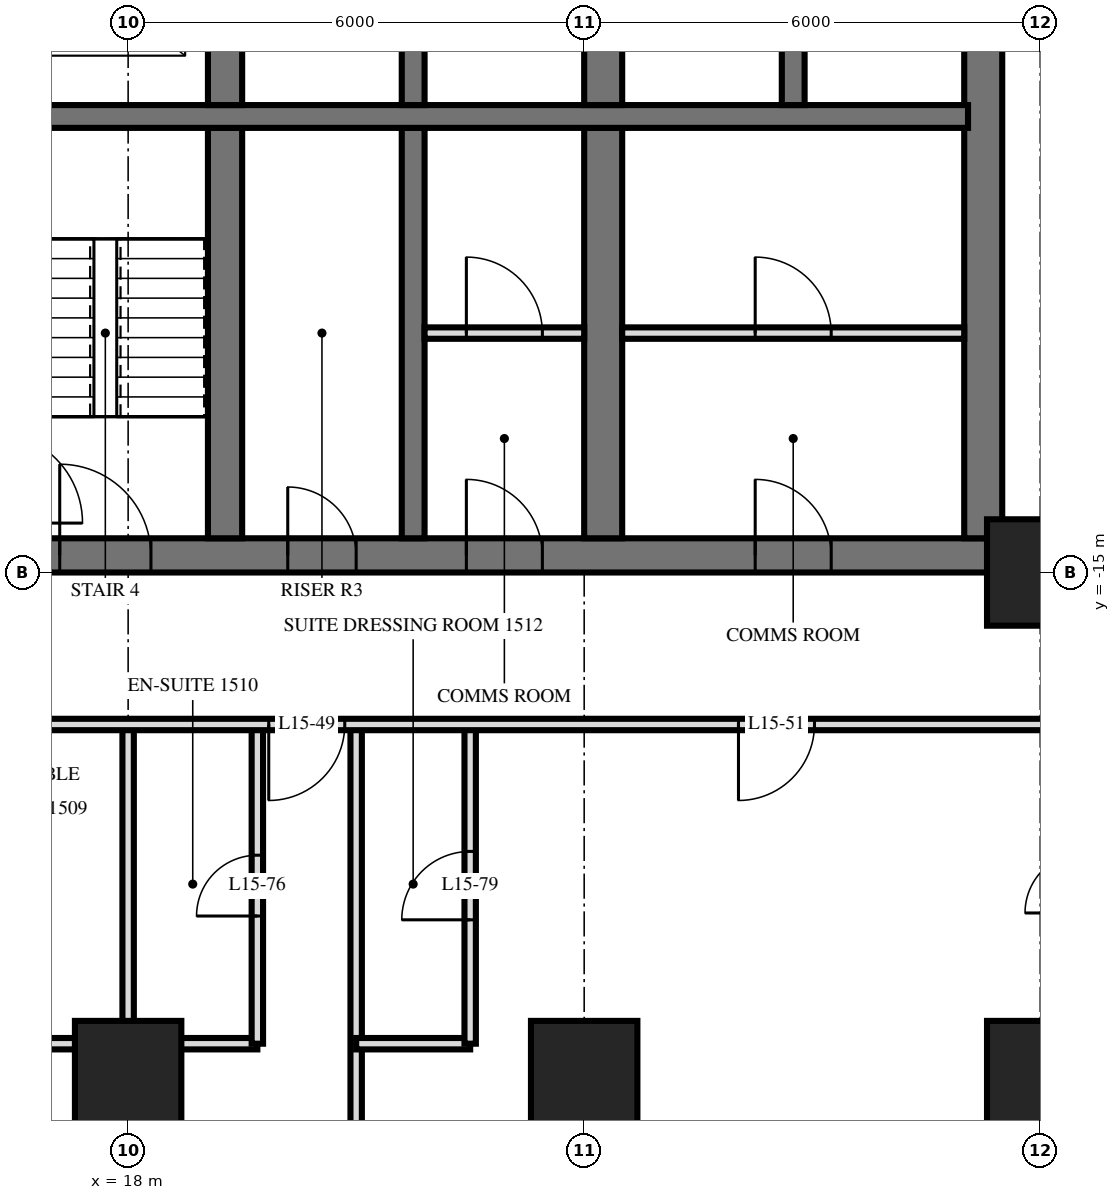
"""IFC4 building model, lengths in metres.
Left out: names, types, materials, properties, quantities, classifications, styles, units other than length and angle.
Written with IfcOpenShell. Run it as: python <this file> out.ifc"""

import sys

from ifc_helpers import new_model, si_unit, direction, frame, frame_2d, origin, origin_2d, place, context, subcontext, project, spatial, rectangle, extrude, element, fill, save


model = new_model("IFC4")
c1 = context("Model", 3, precision=1e-05, world=origin(), true_north=direction((0.0, 1.0)))
c2 = subcontext(c1, "Body", "Model", "MODEL_VIEW")
j1 = project(units=[si_unit("LENGTHUNIT", "METRE"), si_unit("PLANEANGLEUNIT", "RADIAN")], contexts=[c1])
p1 = place(None, origin())
s1 = spatial("IfcSite", under=j1, at=p1, CompositionType="ELEMENT")
p2 = place(p1, origin())
s2 = spatial("IfcBuilding", under=s1, at=p2, CompositionType="ELEMENT")
p3 = place(p2, frame((0.0, 0.0, 63.6)))
s3 = spatial("IfcBuildingStorey", under=s2, at=p3, CompositionType="ELEMENT", Elevation=63.6)
for number, where, z_axis, x_axis in (
    (1, (18.0, -21.6, 0.0), (0.0, 0.0, 1.0), (1.0, 0.0, 0.0)),
    (2, (24.0, -21.6, 0.0), (0.0, 0.0, 1.0), (1.0, 0.0, 0.0)),
    (3, (30.0, -21.6, 0.0), (0.0, 0.0, 1.0), (1.0, 0.0, 0.0)),
    (4, (30.0, -15.0, 0.0), (0.0, 0.0, 1.0), (1.0, 0.0, 0.0)),
):
    element("IfcColumn", number, at=place(p3, frame(where, z_axis=z_axis, x_axis=x_axis)), inside=s3, PredefinedType="COLUMN", context=c2, shape_type="SweptSolid", body=[
        extrude(rectangle(XDim=1.4, YDim=1.4, at=origin_2d()), origin(), (0.0, 0.0, 1.0), 3.6),
    ])
p4 = place(p3, frame((10.0, -14.775, 0.0), z_axis=(0.0, 0.0, 1.0), x_axis=(1.0, 0.0, 0.0)))
e5 = element("IfcWall", 5, at=p4, inside=s3, PredefinedType="SHEAR", context=c2, shape_type="SweptSolid", body=[
    extrude(rectangle(XDim=19.5, YDim=0.45, at=frame_2d((9.75, 0.0))), origin(), (0.0, 0.0, 1.0), 3.6),
])
p5 = place(p4, frame((7.1, 0.0, 0.0)))
e6 = element("IfcOpeningElement", 6, at=p5, cuts=e5, PredefinedType="OPENING", context=c2, shape_type="SweptSolid", body=[
    extrude(rectangle(XDim=1.2, YDim=2.1, at=frame_2d((0.6, 1.05))), frame((0.0, 0.235, 0.0), z_axis=(0.0, -1.0, 0.0), x_axis=(1.0, 0.0, 0.0)), (0.0, 0.0, 1.0), 0.47),
])
p6 = place(p4, frame((4.15, 0.0, 0.0)))
e7 = element("IfcOpeningElement", 7, at=p6, cuts=e5, PredefinedType="OPENING", context=c2, shape_type="SweptSolid", body=[
    extrude(rectangle(XDim=1.1, YDim=2.1, at=frame_2d((0.55, 1.05))), frame((0.0, 0.235, 0.0), z_axis=(0.0, -1.0, 0.0), x_axis=(1.0, 0.0, 0.0)), (0.0, 0.0, 1.0), 0.47),
])
p7 = place(p4, frame((10.1, 0.0, 0.0)))
e8 = element("IfcOpeningElement", 8, at=p7, cuts=e5, PredefinedType="OPENING", context=c2, shape_type="SweptSolid", body=[
    extrude(rectangle(XDim=0.9, YDim=2.1, at=frame_2d((0.45, 1.05))), frame((0.0, 0.235, 0.0), z_axis=(0.0, -1.0, 0.0), x_axis=(1.0, 0.0, 0.0)), (0.0, 0.0, 1.0), 0.47),
])
p8 = place(p4, frame((12.45, 0.0, 0.0)))
e9 = element("IfcOpeningElement", 9, at=p8, cuts=e5, PredefinedType="OPENING", context=c2, shape_type="SweptSolid", body=[
    extrude(rectangle(XDim=1.0, YDim=2.1, at=frame_2d((0.5, 1.05))), frame((0.0, 0.235, 0.0), z_axis=(0.0, -1.0, 0.0), x_axis=(1.0, 0.0, 0.0)), (0.0, 0.0, 1.0), 0.47),
])
p9 = place(p4, frame((16.25, 0.0, 0.0)))
e10 = element("IfcOpeningElement", 10, at=p9, cuts=e5, PredefinedType="OPENING", context=c2, shape_type="SweptSolid", body=[
    extrude(rectangle(XDim=1.0, YDim=2.1, at=frame_2d((0.5, 1.05))), frame((0.0, 0.235, 0.0), z_axis=(0.0, -1.0, 0.0), x_axis=(1.0, 0.0, 0.0)), (0.0, 0.0, 1.0), 0.47),
])
p10 = place(p3, frame((29.25, -14.55, 0.0), z_axis=(0.0, 0.0, 1.0), x_axis=(0.0, 1.0, 0.0)))
e11 = element("IfcWall", 11, at=p10, inside=s3, PredefinedType="SHEAR", context=c2, shape_type="SweptSolid", body=[
    extrude(rectangle(XDim=14.1, YDim=0.5, at=frame_2d((7.05, 0.0))), origin(), (0.0, 0.0, 1.0), 3.6),
])
p11 = place(p3, frame((10.35, -9.0, 0.0), z_axis=(0.0, 0.0, 1.0), x_axis=(1.0, 0.0, 0.0)))
e12 = element("IfcWall", 12, at=p11, inside=s3, PredefinedType="SHEAR", context=c2, shape_type="SweptSolid", body=[
    extrude(rectangle(XDim=18.7, YDim=0.3, at=frame_2d((9.35, 0.0))), origin(), (0.0, 0.0, 1.0), 3.6),
])
p12 = place(p11, frame((3.8, 0.0, 0.0)))
e13 = element("IfcOpeningElement", 13, at=p12, cuts=e12, PredefinedType="OPENING", context=c2, shape_type="SweptSolid", body=[
    extrude(rectangle(XDim=1.1, YDim=2.1, at=frame_2d((0.55, 1.05))), frame((0.0, 0.16, 0.0), z_axis=(0.0, -1.0, 0.0), x_axis=(1.0, 0.0, 0.0)), (0.0, 0.0, 1.0), 0.32),
])
p13 = place(p3, frame((19.275, -8.85, 0.0), z_axis=(0.0, 0.0, 1.0), x_axis=(0.0, 1.0, 0.0)))
e14 = element("IfcWall", 14, at=p13, inside=s3, PredefinedType="SHEAR", context=c2, shape_type="SweptSolid", body=[
    extrude(rectangle(XDim=2.3, YDim=0.45, at=frame_2d((1.15, 0.0))), origin(), (0.0, 0.0, 1.0), 3.6),
])
p14 = place(p3, frame((19.275, -14.55, 0.0), z_axis=(0.0, 0.0, 1.0), x_axis=(0.0, 1.0, 0.0)))
e15 = element("IfcWall", 15, at=p14, inside=s3, PredefinedType="SHEAR", context=c2, shape_type="SweptSolid", body=[
    extrude(rectangle(XDim=5.4, YDim=0.45, at=frame_2d((2.7, 0.0))), origin(), (0.0, 0.0, 1.0), 3.6),
])
p15 = place(p3, frame((21.75, -8.85, 0.0), z_axis=(0.0, 0.0, 1.0), x_axis=(0.0, 1.0, 0.0)))
e16 = element("IfcWall", 16, at=p15, inside=s3, PredefinedType="SHEAR", context=c2, shape_type="SweptSolid", body=[
    extrude(rectangle(XDim=2.3, YDim=0.3, at=frame_2d((1.15, 0.0))), origin(), (0.0, 0.0, 1.0), 3.6),
])
p16 = place(p3, frame((21.75, -14.55, 0.0), z_axis=(0.0, 0.0, 1.0), x_axis=(0.0, 1.0, 0.0)))
e17 = element("IfcWall", 17, at=p16, inside=s3, PredefinedType="SHEAR", context=c2, shape_type="SweptSolid", body=[
    extrude(rectangle(XDim=5.4, YDim=0.3, at=frame_2d((2.7, 0.0))), origin(), (0.0, 0.0, 1.0), 3.6),
])
p17 = place(p3, frame((24.25, -8.85, 0.0), z_axis=(0.0, 0.0, 1.0), x_axis=(0.0, 1.0, 0.0)))
e18 = element("IfcWall", 18, at=p17, inside=s3, PredefinedType="SHEAR", context=c2, shape_type="SweptSolid", body=[
    extrude(rectangle(XDim=2.3, YDim=0.5, at=frame_2d((1.15, 0.0))), origin(), (0.0, 0.0, 1.0), 3.6),
])
p18 = place(p3, frame((24.25, -14.55, 0.0), z_axis=(0.0, 0.0, 1.0), x_axis=(0.0, 1.0, 0.0)))
e19 = element("IfcWall", 19, at=p18, inside=s3, PredefinedType="SHEAR", context=c2, shape_type="SweptSolid", body=[
    extrude(rectangle(XDim=5.4, YDim=0.5, at=frame_2d((2.7, 0.0))), origin(), (0.0, 0.0, 1.0), 3.6),
])
p19 = place(p3, frame((26.75, -8.85, 0.0), z_axis=(0.0, 0.0, 1.0), x_axis=(0.0, 1.0, 0.0)))
e20 = element("IfcWall", 20, at=p19, inside=s3, PredefinedType="SHEAR", context=c2, shape_type="SweptSolid", body=[
    extrude(rectangle(XDim=2.3, YDim=0.3, at=frame_2d((1.15, 0.0))), origin(), (0.0, 0.0, 1.0), 3.6),
])
p20 = place(p3, frame((21.9, -11.85, 0.0), z_axis=(0.0, 0.0, 1.0), x_axis=(1.0, 0.0, 0.0)))
e21 = element("IfcWall", 21, at=p20, inside=s3, PredefinedType="PARTITIONING", context=c2, shape_type="SweptSolid", body=[
    extrude(rectangle(XDim=2.1, YDim=0.15, at=frame_2d((1.05, 0.0))), origin(), (0.0, 0.0, 1.0), 3.3),
])
p21 = place(p20, frame((0.55, 0.0, 0.0)))
e22 = element("IfcOpeningElement", 22, at=p21, cuts=e21, PredefinedType="OPENING", context=c2, shape_type="SweptSolid", body=[
    extrude(rectangle(XDim=1.0, YDim=2.1, at=frame_2d((0.5, 1.05))), frame((0.0, 0.085, 0.0), z_axis=(0.0, -1.0, 0.0), x_axis=(1.0, 0.0, 0.0)), (0.0, 0.0, 1.0), 0.17),
])
p22 = place(p3, frame((24.5, -11.85, 0.0), z_axis=(0.0, 0.0, 1.0), x_axis=(1.0, 0.0, 0.0)))
e23 = element("IfcWall", 23, at=p22, inside=s3, PredefinedType="PARTITIONING", context=c2, shape_type="SweptSolid", body=[
    extrude(rectangle(XDim=4.5, YDim=0.15, at=frame_2d((2.25, 0.0))), origin(), (0.0, 0.0, 1.0), 3.3),
])
p23 = place(p22, frame((1.75, 0.0, 0.0)))
e24 = element("IfcOpeningElement", 24, at=p23, cuts=e23, PredefinedType="OPENING", context=c2, shape_type="SweptSolid", body=[
    extrude(rectangle(XDim=1.0, YDim=2.1, at=frame_2d((0.5, 1.05))), frame((0.0, 0.085, 0.0), z_axis=(0.0, -1.0, 0.0), x_axis=(1.0, 0.0, 0.0)), (0.0, 0.0, 1.0), 0.17),
])
p24 = place(p3, frame((22.5, -21.2, 0.0), z_axis=(0.0, 0.0, 1.0), x_axis=(0.0, 1.0, 0.0)))
e25 = element("IfcWall", 25, at=p24, inside=s3, PredefinedType="PARTITIONING", context=c2, shape_type="SweptSolid", body=[
    extrude(rectangle(XDim=4.2, YDim=0.15, at=frame_2d((2.1, 0.0))), origin(), (0.0, 0.0, 1.0), 3.32),
])
p25 = place(p24, frame((1.63, 0.0, 0.0)))
e26 = element("IfcOpeningElement", 26, at=p25, cuts=e25, PredefinedType="OPENING", context=c2, shape_type="SweptSolid", body=[
    extrude(rectangle(XDim=0.9, YDim=2.1, at=frame_2d((0.45, 1.05))), frame((0.0, 0.085, 0.0), z_axis=(0.0, -1.0, 0.0), x_axis=(1.0, 0.0, 0.0)), (0.0, 0.0, 1.0), 0.17),
])
p26 = place(p3, frame((21.0, -29.22, 0.0), z_axis=(0.0, 0.0, 1.0), x_axis=(0.0, 1.0, 0.0)))
e27 = element("IfcWall", 27, at=p26, inside=s3, PredefinedType="PARTITIONING", context=c2, shape_type="SweptSolid", body=[
    extrude(rectangle(XDim=12.22, YDim=0.15, at=frame_2d((6.11, 0.0))), origin(), (0.0, 0.0, 1.0), 3.32),
])
p27 = place(p3, frame((19.7, -21.2, 0.0), z_axis=(0.0, 0.0, 1.0), x_axis=(0.0, 1.0, 0.0)))
e28 = element("IfcWall", 28, at=p27, inside=s3, PredefinedType="PARTITIONING", context=c2, shape_type="SweptSolid", body=[
    extrude(rectangle(XDim=4.2, YDim=0.15, at=frame_2d((2.1, 0.0))), origin(), (0.0, 0.0, 1.0), 3.32),
])
p28 = place(p27, frame((1.68, 0.0, 0.0)))
e29 = element("IfcOpeningElement", 29, at=p28, cuts=e28, PredefinedType="OPENING", context=c2, shape_type="SweptSolid", body=[
    extrude(rectangle(XDim=0.8, YDim=2.1, at=frame_2d((0.4, 1.05))), frame((0.0, 0.085, 0.0), z_axis=(0.0, -1.0, 0.0), x_axis=(1.0, 0.0, 0.0)), (0.0, 0.0, 1.0), 0.17),
])
p29 = place(p3, frame((18.0, -29.22, 0.0), z_axis=(0.0, 0.0, 1.0), x_axis=(0.0, 1.0, 0.0)))
e30 = element("IfcWall", 30, at=p29, inside=s3, PredefinedType="PARTITIONING", context=c2, shape_type="SweptSolid", body=[
    extrude(rectangle(XDim=12.22, YDim=0.15, at=frame_2d((6.11, 0.0))), origin(), (0.0, 0.0, 1.0), 3.32),
])
p30 = place(p3, frame((15.3, -21.2, 0.0), z_axis=(0.0, 0.0, 1.0), x_axis=(1.0, 0.0, 0.0)))
e31 = element("IfcWall", 31, at=p30, inside=s3, PredefinedType="PARTITIONING", context=c2, shape_type="SweptSolid", body=[
    extrude(rectangle(XDim=4.4, YDim=0.15, at=frame_2d((2.2, 0.0))), origin(), (0.0, 0.0, 1.0), 3.32),
])
p31 = place(p3, frame((21.0, -21.2, 0.0), z_axis=(0.0, 0.0, 1.0), x_axis=(1.0, 0.0, 0.0)))
e32 = element("IfcWall", 32, at=p31, inside=s3, PredefinedType="PARTITIONING", context=c2, shape_type="SweptSolid", body=[
    extrude(rectangle(XDim=1.5, YDim=0.15, at=frame_2d((0.75, 0.0))), origin(), (0.0, 0.0, 1.0), 3.32),
])
p32 = place(p3, frame((-33.12, -17.0, 0.0), z_axis=(0.0, 0.0, 1.0), x_axis=(1.0, 0.0, 0.0)))
e33 = element("IfcWall", 33, at=p32, inside=s3, PredefinedType="PARTITIONING", context=c2, shape_type="SweptSolid", body=[
    extrude(rectangle(XDim=66.24, YDim=0.15, at=frame_2d((33.12, 0.0))), origin(), (0.0, 0.0, 1.0), 3.32),
])
p33 = place(p32, frame((12.27, 0.0, 0.0)))
e34 = element("IfcOpeningElement", 34, at=p33, cuts=e33, PredefinedType="OPENING", context=c2, shape_type="SweptSolid", body=[
    extrude(rectangle(XDim=1.0, YDim=2.1, at=frame_2d((0.5, 1.05))), frame((0.0, 0.085, 0.0), z_axis=(0.0, -1.0, 0.0), x_axis=(1.0, 0.0, 0.0)), (0.0, 0.0, 1.0), 0.17),
])
p34 = place(p32, frame((16.97, 0.0, 0.0)))
e35 = element("IfcOpeningElement", 35, at=p34, cuts=e33, PredefinedType="OPENING", context=c2, shape_type="SweptSolid", body=[
    extrude(rectangle(XDim=1.0, YDim=2.1, at=frame_2d((0.5, 1.05))), frame((0.0, 0.085, 0.0), z_axis=(0.0, -1.0, 0.0), x_axis=(1.0, 0.0, 0.0)), (0.0, 0.0, 1.0), 0.17),
])
p35 = place(p32, frame((18.27, 0.0, 0.0)))
e36 = element("IfcOpeningElement", 36, at=p35, cuts=e33, PredefinedType="OPENING", context=c2, shape_type="SweptSolid", body=[
    extrude(rectangle(XDim=1.0, YDim=2.1, at=frame_2d((0.5, 1.05))), frame((0.0, 0.085, 0.0), z_axis=(0.0, -1.0, 0.0), x_axis=(1.0, 0.0, 0.0)), (0.0, 0.0, 1.0), 0.17),
])
p36 = place(p32, frame((22.97, 0.0, 0.0)))
e37 = element("IfcOpeningElement", 37, at=p36, cuts=e33, PredefinedType="OPENING", context=c2, shape_type="SweptSolid", body=[
    extrude(rectangle(XDim=1.0, YDim=2.1, at=frame_2d((0.5, 1.05))), frame((0.0, 0.085, 0.0), z_axis=(0.0, -1.0, 0.0), x_axis=(1.0, 0.0, 0.0)), (0.0, 0.0, 1.0), 0.17),
])
p37 = place(p32, frame((24.27, 0.0, 0.0)))
e38 = element("IfcOpeningElement", 38, at=p37, cuts=e33, PredefinedType="OPENING", context=c2, shape_type="SweptSolid", body=[
    extrude(rectangle(XDim=1.0, YDim=2.1, at=frame_2d((0.5, 1.05))), frame((0.0, 0.085, 0.0), z_axis=(0.0, -1.0, 0.0), x_axis=(1.0, 0.0, 0.0)), (0.0, 0.0, 1.0), 0.17),
])
p38 = place(p32, frame((28.97, 0.0, 0.0)))
e39 = element("IfcOpeningElement", 39, at=p38, cuts=e33, PredefinedType="OPENING", context=c2, shape_type="SweptSolid", body=[
    extrude(rectangle(XDim=1.0, YDim=2.1, at=frame_2d((0.5, 1.05))), frame((0.0, 0.085, 0.0), z_axis=(0.0, -1.0, 0.0), x_axis=(1.0, 0.0, 0.0)), (0.0, 0.0, 1.0), 0.17),
])
p39 = place(p32, frame((30.27, 0.0, 0.0)))
e40 = element("IfcOpeningElement", 40, at=p39, cuts=e33, PredefinedType="OPENING", context=c2, shape_type="SweptSolid", body=[
    extrude(rectangle(XDim=1.0, YDim=2.1, at=frame_2d((0.5, 1.05))), frame((0.0, 0.085, 0.0), z_axis=(0.0, -1.0, 0.0), x_axis=(1.0, 0.0, 0.0)), (0.0, 0.0, 1.0), 0.17),
])
p40 = place(p32, frame((33.82, 0.0, 0.0)))
e41 = element("IfcOpeningElement", 41, at=p40, cuts=e33, PredefinedType="OPENING", context=c2, shape_type="SweptSolid", body=[
    extrude(rectangle(XDim=1.0, YDim=2.1, at=frame_2d((0.5, 1.05))), frame((0.0, 0.085, 0.0), z_axis=(0.0, -1.0, 0.0), x_axis=(1.0, 0.0, 0.0)), (0.0, 0.0, 1.0), 0.17),
])
p41 = place(p32, frame((46.27, 0.0, 0.0)))
e42 = element("IfcOpeningElement", 42, at=p41, cuts=e33, PredefinedType="OPENING", context=c2, shape_type="SweptSolid", body=[
    extrude(rectangle(XDim=1.0, YDim=2.1, at=frame_2d((0.5, 1.05))), frame((0.0, 0.085, 0.0), z_axis=(0.0, -1.0, 0.0), x_axis=(1.0, 0.0, 0.0)), (0.0, 0.0, 1.0), 0.17),
])
p42 = place(p32, frame((52.97, 0.0, 0.0)))
e43 = element("IfcOpeningElement", 43, at=p42, cuts=e33, PredefinedType="OPENING", context=c2, shape_type="SweptSolid", body=[
    extrude(rectangle(XDim=1.0, YDim=2.1, at=frame_2d((0.5, 1.05))), frame((0.0, 0.085, 0.0), z_axis=(0.0, -1.0, 0.0), x_axis=(1.0, 0.0, 0.0)), (0.0, 0.0, 1.0), 0.17),
])
p43 = place(p32, frame((6.05, 0.0, 0.0)))
e44 = element("IfcOpeningElement", 44, at=p43, cuts=e33, PredefinedType="OPENING", context=c2, shape_type="SweptSolid", body=[
    extrude(rectangle(XDim=1.0, YDim=2.1, at=frame_2d((0.5, 1.05))), frame((0.0, 0.085, 0.0), z_axis=(0.0, -1.0, 0.0), x_axis=(1.0, 0.0, 0.0)), (0.0, 0.0, 1.0), 0.17),
])
p44 = place(p32, frame((59.15, 0.0, 0.0)))
e45 = element("IfcOpeningElement", 45, at=p44, cuts=e33, PredefinedType="OPENING", context=c2, shape_type="SweptSolid", body=[
    extrude(rectangle(XDim=1.0, YDim=2.1, at=frame_2d((0.5, 1.05))), frame((0.0, 0.085, 0.0), z_axis=(0.0, -1.0, 0.0), x_axis=(1.0, 0.0, 0.0)), (0.0, 0.0, 1.0), 0.17),
])
p45 = place(p3, frame((29.55, -15.0, 0.0), z_axis=(0.0, 0.0, 1.0), x_axis=(1.0, 0.0, 0.0)))
e46 = element("IfcWall", 46, at=p45, inside=s3, PredefinedType="PARTITIONING", context=c2, shape_type="SweptSolid", body=[
    extrude(rectangle(XDim=3.57, YDim=0.15, at=frame_2d((1.785, 0.0))), origin(), (0.0, 0.0, 1.0), 3.32),
])
p46 = place(p45, frame((1.205, 0.0, 0.0)))
e47 = element("IfcOpeningElement", 47, at=p46, cuts=e46, PredefinedType="OPENING", context=c2, shape_type="SweptSolid", body=[
    extrude(rectangle(XDim=0.8, YDim=2.1, at=frame_2d((0.4, 1.05))), frame((0.0, 0.085, 0.0), z_axis=(0.0, -1.0, 0.0), x_axis=(1.0, 0.0, 0.0)), (0.0, 0.0, 1.0), 0.17),
])
p47 = place(p5, origin())
e48 = element("IfcDoor", 48, at=p47, inside=s3, OperationType="SINGLE_SWING_RIGHT", PredefinedType="DOOR", context=c2, shape_type="SweptSolid", body=[
    extrude(rectangle(XDim=1.2, YDim=2.1, at=frame_2d((0.6, 1.05))), frame((0.0, 0.025, 0.0), z_axis=(0.0, -1.0, 0.0), x_axis=(1.0, 0.0, 0.0)), (0.0, 0.0, 1.0), 0.05),
])
fill(e6, e48)
p48 = place(p7, origin())
e49 = element("IfcDoor", 49, at=p48, inside=s3, OperationType="SINGLE_SWING_RIGHT", PredefinedType="DOOR", context=c2, shape_type="SweptSolid", body=[
    extrude(rectangle(XDim=0.9, YDim=2.1, at=frame_2d((0.45, 1.05))), frame((0.0, 0.025, 0.0), z_axis=(0.0, -1.0, 0.0), x_axis=(1.0, 0.0, 0.0)), (0.0, 0.0, 1.0), 0.05),
])
fill(e8, e49)
p49 = place(p8, origin())
e50 = element("IfcDoor", 50, at=p49, inside=s3, OperationType="SINGLE_SWING_RIGHT", PredefinedType="DOOR", context=c2, shape_type="SweptSolid", body=[
    extrude(rectangle(XDim=1.0, YDim=2.1, at=frame_2d((0.5, 1.05))), frame((0.0, 0.025, 0.0), z_axis=(0.0, -1.0, 0.0), x_axis=(1.0, 0.0, 0.0)), (0.0, 0.0, 1.0), 0.05),
])
fill(e9, e50)
p50 = place(p9, origin())
e51 = element("IfcDoor", 51, at=p50, inside=s3, OperationType="SINGLE_SWING_RIGHT", PredefinedType="DOOR", context=c2, shape_type="SweptSolid", body=[
    extrude(rectangle(XDim=1.0, YDim=2.1, at=frame_2d((0.5, 1.05))), frame((0.0, 0.025, 0.0), z_axis=(0.0, -1.0, 0.0), x_axis=(1.0, 0.0, 0.0)), (0.0, 0.0, 1.0), 0.05),
])
fill(e10, e51)
p51 = place(p21, origin())
e52 = element("IfcDoor", 52, at=p51, inside=s3, OperationType="SINGLE_SWING_RIGHT", PredefinedType="DOOR", context=c2, shape_type="SweptSolid", body=[
    extrude(rectangle(XDim=1.0, YDim=2.1, at=frame_2d((0.5, 1.05))), frame((0.0, 0.025, 0.0), z_axis=(0.0, -1.0, 0.0), x_axis=(1.0, 0.0, 0.0)), (0.0, 0.0, 1.0), 0.05),
])
fill(e22, e52)
p52 = place(p23, origin())
e53 = element("IfcDoor", 53, at=p52, inside=s3, OperationType="SINGLE_SWING_RIGHT", PredefinedType="DOOR", context=c2, shape_type="SweptSolid", body=[
    extrude(rectangle(XDim=1.0, YDim=2.1, at=frame_2d((0.5, 1.05))), frame((0.0, 0.025, 0.0), z_axis=(0.0, -1.0, 0.0), x_axis=(1.0, 0.0, 0.0)), (0.0, 0.0, 1.0), 0.05),
])
fill(e24, e53)
p53 = place(p42, frame((0.5, 0.0, 0.0), z_axis=(0.0, 0.0, 1.0), x_axis=(-1.0, 0.0, 0.0)))
e54 = element("IfcDoor", 54, at=p53, inside=s3, OperationType="SINGLE_SWING_LEFT", PredefinedType="DOOR", context=c2, shape_type="SweptSolid", body=[
    extrude(rectangle(XDim=1.0, YDim=2.1, at=frame_2d((0.0, 1.05))), frame((0.0, -0.025, 0.0), z_axis=(0.0, 1.0, 0.0), x_axis=(-1.0, 0.0, 0.0)), (0.0, 0.0, 1.0), 0.05),
])
fill(e43, e54)
p54 = place(p44, frame((0.5, 0.0, 0.0), z_axis=(0.0, 0.0, 1.0), x_axis=(-1.0, 0.0, 0.0)))
e55 = element("IfcDoor", 55, at=p54, inside=s3, OperationType="SINGLE_SWING_LEFT", PredefinedType="DOOR", context=c2, shape_type="SweptSolid", body=[
    extrude(rectangle(XDim=1.0, YDim=2.1, at=frame_2d((0.0, 1.05))), frame((0.0, -0.025, 0.0), z_axis=(0.0, 1.0, 0.0), x_axis=(-1.0, 0.0, 0.0)), (0.0, 0.0, 1.0), 0.05),
])
fill(e45, e55)
p55 = place(p28, origin())
e56 = element("IfcDoor", 56, at=p55, inside=s3, OperationType="SINGLE_SWING_RIGHT", PredefinedType="DOOR", context=c2, shape_type="SweptSolid", body=[
    extrude(rectangle(XDim=0.8, YDim=2.1, at=frame_2d((0.4, 1.05))), frame((0.0, 0.025, 0.0), z_axis=(0.0, -1.0, 0.0), x_axis=(1.0, 0.0, 0.0)), (0.0, 0.0, 1.0), 0.05),
])
fill(e29, e56)
p56 = place(p25, origin())
e57 = element("IfcDoor", 57, at=p56, inside=s3, OperationType="SINGLE_SWING_RIGHT", PredefinedType="DOOR", context=c2, shape_type="SweptSolid", body=[
    extrude(rectangle(XDim=0.9, YDim=2.1, at=frame_2d((0.45, 1.05))), frame((0.0, 0.025, 0.0), z_axis=(0.0, -1.0, 0.0), x_axis=(1.0, 0.0, 0.0)), (0.0, 0.0, 1.0), 0.05),
])
fill(e26, e57)
save(model, sys.argv[1])
